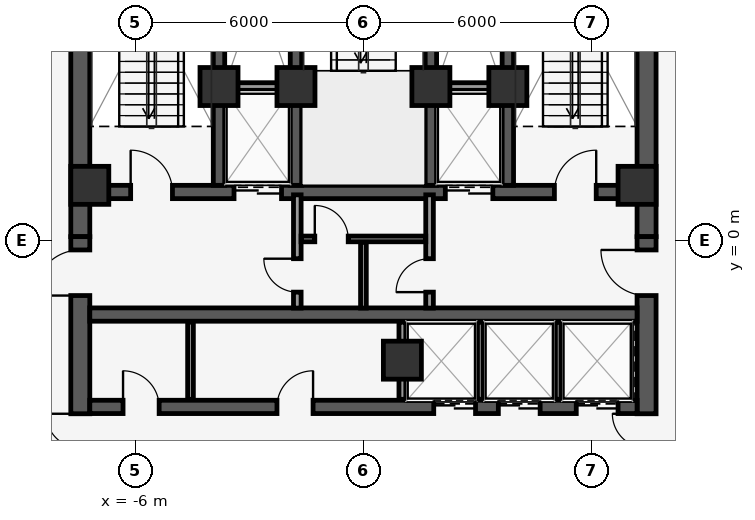
"""IFC4 building model, lengths in metres.
Left out: names, types, materials, properties, quantities, classifications, styles, units other than length and angle.
Written with IfcOpenShell. Run it as: python <this file> out.ifc"""

import sys

from ifc_helpers import new_model, si_unit, direction, frame, frame_2d, origin, origin_2d, place, context, subcontext, project, spatial, rectangle, extrude, element, fill, save


model = new_model("IFC4")
c1 = context("Model", 3, precision=1e-05, world=origin(), true_north=direction((0.0, 1.0)))
c2 = subcontext(c1, "Body", "Model", "MODEL_VIEW")
j1 = project(units=[si_unit("LENGTHUNIT", "METRE"), si_unit("PLANEANGLEUNIT", "RADIAN")], contexts=[c1])
p1 = place(None, origin())
s1 = spatial("IfcSite", under=j1, at=p1, CompositionType="ELEMENT")
p2 = place(p1, origin())
s2 = spatial("IfcBuilding", under=s1, at=p2, CompositionType="ELEMENT")
p3 = place(p2, frame((0.0, 0.0, 310.6)))
s3 = spatial("IfcBuildingStorey", under=s2, at=p3, CompositionType="ELEMENT", Elevation=310.6)
p4 = place(p3, frame((-7.2, 1.275, 0.0), z_axis=(0.0, 0.0, 1.0), x_axis=(1.0, 0.0, 0.0)))
e1 = element("IfcWall", 1, at=p4, inside=s3, PredefinedType="SHEAR", context=c2, shape_type="SweptSolid", body=[
    extrude(rectangle(XDim=14.4, YDim=0.35, at=frame_2d((7.2, 0.0))), origin(), (0.0, 0.0, 1.0), 3.85),
])
p5 = place(p4, frame((3.795, 0.0, 0.0)))
e2 = element("IfcOpeningElement", 2, at=p5, cuts=e1, PredefinedType="OPENING", context=c2, shape_type="SweptSolid", body=[
    extrude(rectangle(XDim=1.25, YDim=2.25, at=frame_2d((0.625, 1.125))), frame((0.0, 0.185, 0.0), z_axis=(0.0, -1.0, 0.0), x_axis=(1.0, 0.0, 0.0)), (0.0, 0.0, 1.0), 0.37),
])
p6 = place(p4, frame((9.355, 0.0, 0.0)))
e3 = element("IfcOpeningElement", 3, at=p6, cuts=e1, PredefinedType="OPENING", context=c2, shape_type="SweptSolid", body=[
    extrude(rectangle(XDim=1.25, YDim=2.25, at=frame_2d((0.625, 1.125))), frame((0.0, 0.185, 0.0), z_axis=(0.0, -1.0, 0.0), x_axis=(1.0, 0.0, 0.0)), (0.0, 0.0, 1.0), 0.37),
])
p7 = place(p4, frame((1.075, 0.0, 0.0)))
e4 = element("IfcOpeningElement", 4, at=p7, cuts=e1, PredefinedType="OPENING", context=c2, shape_type="SweptSolid", body=[
    extrude(rectangle(XDim=1.1, YDim=2.15, at=frame_2d((0.55, 1.075))), frame((0.0, 0.185, 0.0), z_axis=(0.0, -1.0, 0.0), x_axis=(1.0, 0.0, 0.0)), (0.0, 0.0, 1.0), 0.37),
])
p8 = place(p4, frame((12.225, 0.0, 0.0)))
e5 = element("IfcOpeningElement", 5, at=p8, cuts=e1, PredefinedType="OPENING", context=c2, shape_type="SweptSolid", body=[
    extrude(rectangle(XDim=1.1, YDim=2.15, at=frame_2d((0.55, 1.075))), frame((0.0, 0.185, 0.0), z_axis=(0.0, -1.0, 0.0), x_axis=(1.0, 0.0, 0.0)), (0.0, 0.0, 1.0), 0.37),
])
for number, where, z_axis, x_axis in (
    (6, (-3.8, 1.45, 0.0), (0.0, 0.0, 1.0), (0.0, 1.0, 0.0)),
    (7, (-1.775, 1.45, 0.0), (0.0, 0.0, 1.0), (0.0, 1.0, 0.0)),
    (8, (1.775, 1.45, 0.0), (0.0, 0.0, 1.0), (0.0, 1.0, 0.0)),
    (9, (3.8, 1.45, 0.0), (0.0, 0.0, 1.0), (0.0, 1.0, 0.0)),
):
    element("IfcWall", number, at=place(p3, frame(where, z_axis=z_axis, x_axis=x_axis)), inside=s3, PredefinedType="SHEAR", context=c2, shape_type="SweptSolid", body=[
        extrude(rectangle(XDim=7.7, YDim=0.3, at=frame_2d((3.85, 0.0))), origin(), (0.0, 0.0, 1.0), 3.85),
    ])
for number, where, z_axis, x_axis in (
    (10, (-7.45, 0.1, 0.0), (0.0, 0.0, 1.0), (0.0, 1.0, 0.0)),
    (11, (7.45, 0.1, 0.0), (0.0, 0.0, 1.0), (0.0, 1.0, 0.0)),
):
    element("IfcWall", number, at=place(p3, frame(where, z_axis=z_axis, x_axis=x_axis)), inside=s3, PredefinedType="SHEAR", context=c2, shape_type="SweptSolid", body=[
        extrude(rectangle(XDim=9.05, YDim=0.5, at=frame_2d((4.525, 0.0))), origin(), (0.0, 0.0, 1.0), 3.85),
    ])
p9 = place(p3, frame((-7.45, -9.0, 0.0), z_axis=(0.0, 0.0, 1.0), x_axis=(0.0, 1.0, 0.0)))
e12 = element("IfcWall", 12, at=p9, inside=s3, PredefinedType="SHEAR", context=c2, shape_type="SweptSolid", body=[
    extrude(rectangle(XDim=9.1, YDim=0.5, at=frame_2d((4.55, 0.0))), origin(), (0.0, 0.0, 1.0), 3.85),
])
p10 = place(p9, frame((2.64, 0.0, 0.0)))
e13 = element("IfcOpeningElement", 13, at=p10, cuts=e12, PredefinedType="OPENING", context=c2, shape_type="SweptSolid", body=[
    extrude(rectangle(XDim=1.8, YDim=2.2, at=frame_2d((0.9, 1.1))), frame((0.0, 0.26, 0.0), z_axis=(0.0, -1.0, 0.0), x_axis=(1.0, 0.0, 0.0)), (0.0, 0.0, 1.0), 0.52),
])
p11 = place(p9, frame((7.55, 0.0, 0.0)))
e14 = element("IfcOpeningElement", 14, at=p11, cuts=e12, PredefinedType="OPENING", context=c2, shape_type="SweptSolid", body=[
    extrude(rectangle(XDim=1.2, YDim=2.15, at=frame_2d((0.6, 1.075))), frame((0.0, 0.26, 0.0), z_axis=(0.0, -1.0, 0.0), x_axis=(1.0, 0.0, 0.0)), (0.0, 0.0, 1.0), 0.52),
])
p12 = place(p3, frame((7.45, -9.0, 0.0), z_axis=(0.0, 0.0, 1.0), x_axis=(0.0, 1.0, 0.0)))
e15 = element("IfcWall", 15, at=p12, inside=s3, PredefinedType="SHEAR", context=c2, shape_type="SweptSolid", body=[
    extrude(rectangle(XDim=9.1, YDim=0.5, at=frame_2d((4.55, 0.0))), origin(), (0.0, 0.0, 1.0), 3.85),
])
p13 = place(p12, frame((2.64, 0.0, 0.0)))
e16 = element("IfcOpeningElement", 16, at=p13, cuts=e15, PredefinedType="OPENING", context=c2, shape_type="SweptSolid", body=[
    extrude(rectangle(XDim=1.8, YDim=2.2, at=frame_2d((0.9, 1.1))), frame((0.0, 0.26, 0.0), z_axis=(0.0, -1.0, 0.0), x_axis=(1.0, 0.0, 0.0)), (0.0, 0.0, 1.0), 0.52),
])
p14 = place(p12, frame((7.55, 0.0, 0.0)))
e17 = element("IfcOpeningElement", 17, at=p14, cuts=e15, PredefinedType="OPENING", context=c2, shape_type="SweptSolid", body=[
    extrude(rectangle(XDim=1.2, YDim=2.15, at=frame_2d((0.6, 1.075))), frame((0.0, 0.26, 0.0), z_axis=(0.0, -1.0, 0.0), x_axis=(1.0, 0.0, 0.0)), (0.0, 0.0, 1.0), 0.52),
])
p15 = place(p3, frame((-7.2, -1.95, 0.0), z_axis=(0.0, 0.0, 1.0), x_axis=(1.0, 0.0, 0.0)))
e18 = element("IfcWall", 18, at=p15, inside=s3, PredefinedType="SHEAR", context=c2, shape_type="SweptSolid", body=[
    extrude(rectangle(XDim=14.4, YDim=0.35, at=frame_2d((7.2, 0.0))), origin(), (0.0, 0.0, 1.0), 3.85),
])
p16 = place(p3, frame((-7.2, -4.38, 0.0), z_axis=(0.0, 0.0, 1.0), x_axis=(1.0, 0.0, 0.0)))
e19 = element("IfcWall", 19, at=p16, inside=s3, PredefinedType="SHEAR", context=c2, shape_type="SweptSolid", body=[
    extrude(rectangle(XDim=14.4, YDim=0.35, at=frame_2d((7.2, 0.0))), origin(), (0.0, 0.0, 1.0), 3.85),
])
p17 = place(p16, frame((9.05, 0.0, 0.0)))
e20 = element("IfcOpeningElement", 20, at=p17, cuts=e19, PredefinedType="OPENING", context=c2, shape_type="SweptSolid", body=[
    extrude(rectangle(XDim=1.1, YDim=2.2, at=frame_2d((0.55, 1.1))), frame((0.0, 0.185, 0.0), z_axis=(0.0, -1.0, 0.0), x_axis=(1.0, 0.0, 0.0)), (0.0, 0.0, 1.0), 0.37),
])
p18 = place(p16, frame((10.75, 0.0, 0.0)))
e21 = element("IfcOpeningElement", 21, at=p18, cuts=e19, PredefinedType="OPENING", context=c2, shape_type="SweptSolid", body=[
    extrude(rectangle(XDim=1.1, YDim=2.2, at=frame_2d((0.55, 1.1))), frame((0.0, 0.185, 0.0), z_axis=(0.0, -1.0, 0.0), x_axis=(1.0, 0.0, 0.0)), (0.0, 0.0, 1.0), 0.37),
])
p19 = place(p16, frame((12.8, 0.0, 0.0)))
e22 = element("IfcOpeningElement", 22, at=p19, cuts=e19, PredefinedType="OPENING", context=c2, shape_type="SweptSolid", body=[
    extrude(rectangle(XDim=1.1, YDim=2.2, at=frame_2d((0.55, 1.1))), frame((0.0, 0.185, 0.0), z_axis=(0.0, -1.0, 0.0), x_axis=(1.0, 0.0, 0.0)), (0.0, 0.0, 1.0), 0.37),
])
p20 = place(p16, frame((0.875, 0.0, 0.0)))
e23 = element("IfcOpeningElement", 23, at=p20, cuts=e19, PredefinedType="OPENING", context=c2, shape_type="SweptSolid", body=[
    extrude(rectangle(XDim=0.95, YDim=2.15, at=frame_2d((0.475, 1.075))), frame((0.0, 0.185, 0.0), z_axis=(0.0, -1.0, 0.0), x_axis=(1.0, 0.0, 0.0)), (0.0, 0.0, 1.0), 0.37),
])
p21 = place(p16, frame((4.925, 0.0, 0.0)))
e24 = element("IfcOpeningElement", 24, at=p21, cuts=e19, PredefinedType="OPENING", context=c2, shape_type="SweptSolid", body=[
    extrude(rectangle(XDim=0.95, YDim=2.15, at=frame_2d((0.475, 1.075))), frame((0.0, 0.185, 0.0), z_axis=(0.0, -1.0, 0.0), x_axis=(1.0, 0.0, 0.0)), (0.0, 0.0, 1.0), 0.37),
])
for number, where, z_axis, x_axis in (
    (25, (7.2, 1.45, 0.0), (0.0, 0.0, 1.0), (1.0, 0.0, 0.0)),
    (26, (-7.2, 1.45, 0.0), (0.0, 0.0, 1.0), (1.0, 0.0, 0.0)),
    (27, (-3.8, 4.05, 0.0), (0.0, 0.0, 1.0), (1.0, 0.0, 0.0)),
    (28, (3.8, 4.05, 0.0), (0.0, 0.0, 1.0), (1.0, 0.0, 0.0)),
    (29, (-1.775, 4.05, 0.0), (0.0, 0.0, 1.0), (1.0, 0.0, 0.0)),
    (30, (1.775, 4.05, 0.0), (0.0, 0.0, 1.0), (1.0, 0.0, 0.0)),
    (31, (1.025, -3.15, 0.0), (0.0, 0.0, 1.0), (1.0, 0.0, 0.0)),
):
    element("IfcColumn", number, at=place(p3, frame(where, z_axis=z_axis, x_axis=x_axis)), inside=s3, PredefinedType="COLUMN", context=c2, shape_type="SweptSolid", body=[
        extrude(rectangle(XDim=1.0, YDim=1.0, at=origin_2d()), origin(), (0.0, 0.0, 1.0), 4.1),
    ])
p22 = place(p3, frame((25.8, 9.083, 0.0), z_axis=(0.0, 0.0, 1.0), x_axis=(-0.55919392155, -0.829036885851, 0.0)))
e32 = element("IfcWall", 32, at=p22, inside=s3, PredefinedType="STANDARD", context=c2, shape_type="SweptSolid", body=[
    extrude(rectangle(XDim=43.915, YDim=0.28, at=frame_2d((21.958, 0.0))), origin(), (0.0, 0.0, 1.0), 3.85),
])
p23 = place(p22, frame((21.457, 0.0, 0.0)))
e33 = element("IfcOpeningElement", 33, at=p23, cuts=e32, PredefinedType="OPENING", context=c2, shape_type="SweptSolid", body=[
    extrude(rectangle(XDim=1.0, YDim=2.15, at=frame_2d((0.5, 1.075))), frame((0.0, 0.15, 0.0), z_axis=(0.0, -1.0, 0.0), x_axis=(1.0, 0.0, 0.0)), (0.0, 0.0, 1.0), 0.3),
])
p24 = place(p22, frame((4.607, 0.0, 0.85)))
e34 = element("IfcOpeningElement", 34, at=p24, cuts=e32, PredefinedType="OPENING", context=c2, shape_type="SweptSolid", body=[
    extrude(rectangle(XDim=1.1, YDim=2.15, at=frame_2d((0.55, 1.075))), frame((0.0, 0.15, 0.0), z_axis=(0.0, -1.0, 0.0), x_axis=(1.0, 0.0, 0.0)), (0.0, 0.0, 1.0), 0.3),
])
p25 = place(p22, frame((15.807, 0.0, 0.85)))
e35 = element("IfcOpeningElement", 35, at=p25, cuts=e32, PredefinedType="OPENING", context=c2, shape_type="SweptSolid", body=[
    extrude(rectangle(XDim=1.1, YDim=2.15, at=frame_2d((0.55, 1.075))), frame((0.0, 0.15, 0.0), z_axis=(0.0, -1.0, 0.0), x_axis=(1.0, 0.0, 0.0)), (0.0, 0.0, 1.0), 0.3),
])
p26 = place(p22, frame((27.007, 0.0, 0.85)))
e36 = element("IfcOpeningElement", 36, at=p26, cuts=e32, PredefinedType="OPENING", context=c2, shape_type="SweptSolid", body=[
    extrude(rectangle(XDim=1.1, YDim=2.15, at=frame_2d((0.55, 1.075))), frame((0.0, 0.15, 0.0), z_axis=(0.0, -1.0, 0.0), x_axis=(1.0, 0.0, 0.0)), (0.0, 0.0, 1.0), 0.3),
])
p27 = place(p22, frame((32.607, 0.0, 0.85)))
e37 = element("IfcOpeningElement", 37, at=p27, cuts=e32, PredefinedType="OPENING", context=c2, shape_type="SweptSolid", body=[
    extrude(rectangle(XDim=1.1, YDim=2.15, at=frame_2d((0.55, 1.075))), frame((0.0, 0.15, 0.0), z_axis=(0.0, -1.0, 0.0), x_axis=(1.0, 0.0, 0.0)), (0.0, 0.0, 1.0), 0.3),
])
p28 = place(p22, frame((38.207, 0.0, 0.85)))
e38 = element("IfcOpeningElement", 38, at=p28, cuts=e32, PredefinedType="OPENING", context=c2, shape_type="SweptSolid", body=[
    extrude(rectangle(XDim=1.1, YDim=2.15, at=frame_2d((0.55, 1.075))), frame((0.0, 0.15, 0.0), z_axis=(0.0, -1.0, 0.0), x_axis=(1.0, 0.0, 0.0)), (0.0, 0.0, 1.0), 0.3),
])
p29 = place(p3, frame((-4.988, -26.865, 0.0), z_axis=(0.0, 0.0, 1.0), x_axis=(-0.431592936847, 0.902068476815, 0.0)))
e39 = element("IfcWall", 39, at=p29, inside=s3, PredefinedType="STANDARD", context=c2, shape_type="SweptSolid", body=[
    extrude(rectangle(XDim=43.18, YDim=0.28, at=frame_2d((21.59, 0.0))), origin(), (0.0, 0.0, 1.0), 3.85),
])
p30 = place(p29, frame((4.24, 0.0, 0.85)))
e40 = element("IfcOpeningElement", 40, at=p30, cuts=e39, PredefinedType="OPENING", context=c2, shape_type="SweptSolid", body=[
    extrude(rectangle(XDim=1.1, YDim=2.15, at=frame_2d((0.55, 1.075))), frame((0.0, 0.15, 0.0), z_axis=(0.0, -1.0, 0.0), x_axis=(1.0, 0.0, 0.0)), (0.0, 0.0, 1.0), 0.3),
])
p31 = place(p29, frame((9.84, 0.0, 0.85)))
e41 = element("IfcOpeningElement", 41, at=p31, cuts=e39, PredefinedType="OPENING", context=c2, shape_type="SweptSolid", body=[
    extrude(rectangle(XDim=1.1, YDim=2.15, at=frame_2d((0.55, 1.075))), frame((0.0, 0.15, 0.0), z_axis=(0.0, -1.0, 0.0), x_axis=(1.0, 0.0, 0.0)), (0.0, 0.0, 1.0), 0.3),
])
p32 = place(p29, frame((32.24, 0.0, 0.85)))
e42 = element("IfcOpeningElement", 42, at=p32, cuts=e39, PredefinedType="OPENING", context=c2, shape_type="SweptSolid", body=[
    extrude(rectangle(XDim=1.1, YDim=2.15, at=frame_2d((0.55, 1.075))), frame((0.0, 0.15, 0.0), z_axis=(0.0, -1.0, 0.0), x_axis=(1.0, 0.0, 0.0)), (0.0, 0.0, 1.0), 0.3),
])
p33 = place(p29, frame((37.84, 0.0, 0.85)))
e43 = element("IfcOpeningElement", 43, at=p33, cuts=e39, PredefinedType="OPENING", context=c2, shape_type="SweptSolid", body=[
    extrude(rectangle(XDim=1.1, YDim=2.15, at=frame_2d((0.55, 1.075))), frame((0.0, 0.15, 0.0), z_axis=(0.0, -1.0, 0.0), x_axis=(1.0, 0.0, 0.0)), (0.0, 0.0, 1.0), 0.3),
])
for number, where, z_axis, x_axis in (
    (44, (-3.65, 4.05, 0.0), (0.0, 0.0, 1.0), (1.0, 0.0, 0.0)),
    (45, (1.92, 4.05, 0.0), (0.0, 0.0, 1.0), (1.0, 0.0, 0.0)),
):
    element("IfcWall", number, at=place(p3, frame(where, z_axis=z_axis, x_axis=x_axis)), inside=s3, PredefinedType="PARTITIONING", context=c2, shape_type="SweptSolid", body=[
        extrude(rectangle(XDim=1.73, YDim=0.2, at=frame_2d((0.865, 0.0))), origin(), (0.0, 0.0, 1.0), 3.85),
    ])
p34 = place(p3, frame((1.025, -4.18, 0.0), z_axis=(0.0, 0.0, 1.0), x_axis=(0.0, 1.0, 0.0)))
e46 = element("IfcWall", 46, at=p34, inside=s3, PredefinedType="PARTITIONING", context=c2, shape_type="SweptSolid", body=[
    extrude(rectangle(XDim=2.03, YDim=0.18, at=frame_2d((1.015, 0.0))), origin(), (0.0, 0.0, 1.0), 2.898),
])
for number, where, z_axis, x_axis in (
    (47, (-4.55, -4.18, 0.0), (0.0, 0.0, 1.0), (0.0, 1.0, 0.0)),
    (48, (3.075, -4.18, 0.0), (0.0, 0.0, 1.0), (0.0, 1.0, 0.0)),
    (49, (5.125, -4.18, 0.0), (0.0, 0.0, 1.0), (0.0, 1.0, 0.0)),
):
    element("IfcWall", number, at=place(p3, frame(where, z_axis=z_axis, x_axis=x_axis)), inside=s3, PredefinedType="PARTITIONING", context=c2, shape_type="SweptSolid", body=[
        extrude(rectangle(XDim=2.03, YDim=0.15, at=frame_2d((1.015, 0.0))), origin(), (0.0, 0.0, 1.0), 3.85),
    ])
p35 = place(p3, frame((-1.74, -1.78, 0.0), z_axis=(0.0, 0.0, 1.0), x_axis=(0.0, 1.0, 0.0)))
e50 = element("IfcWall", 50, at=p35, inside=s3, PredefinedType="PARTITIONING", context=c2, shape_type="SweptSolid", body=[
    extrude(rectangle(XDim=2.98, YDim=0.2, at=frame_2d((1.49, 0.0))), origin(), (0.0, 0.0, 1.0), 3.85),
])
p36 = place(p35, frame((0.42, 0.0, 0.0)))
e51 = element("IfcOpeningElement", 51, at=p36, cuts=e50, PredefinedType="OPENING", context=c2, shape_type="SweptSolid", body=[
    extrude(rectangle(XDim=0.88, YDim=2.15, at=frame_2d((0.44, 1.075))), frame((0.0, 0.11, 0.0), z_axis=(0.0, -1.0, 0.0), x_axis=(1.0, 0.0, 0.0)), (0.0, 0.0, 1.0), 0.22),
])
p37 = place(p3, frame((1.74, -1.78, 0.0), z_axis=(0.0, 0.0, 1.0), x_axis=(0.0, 1.0, 0.0)))
e52 = element("IfcWall", 52, at=p37, inside=s3, PredefinedType="PARTITIONING", context=c2, shape_type="SweptSolid", body=[
    extrude(rectangle(XDim=2.98, YDim=0.2, at=frame_2d((1.49, 0.0))), origin(), (0.0, 0.0, 1.0), 3.85),
])
p38 = place(p37, frame((0.42, 0.0, 0.0)))
e53 = element("IfcOpeningElement", 53, at=p38, cuts=e52, PredefinedType="OPENING", context=c2, shape_type="SweptSolid", body=[
    extrude(rectangle(XDim=0.88, YDim=2.15, at=frame_2d((0.44, 1.075))), frame((0.0, 0.11, 0.0), z_axis=(0.0, -1.0, 0.0), x_axis=(1.0, 0.0, 0.0)), (0.0, 0.0, 1.0), 0.22),
])
p39 = place(p3, frame((-1.64, 0.04, 0.0), z_axis=(0.0, 0.0, 1.0), x_axis=(1.0, 0.0, 0.0)))
e54 = element("IfcWall", 54, at=p39, inside=s3, PredefinedType="PARTITIONING", context=c2, shape_type="SweptSolid", body=[
    extrude(rectangle(XDim=3.28, YDim=0.15, at=frame_2d((1.64, 0.0))), origin(), (0.0, 0.0, 1.0), 3.85),
])
p40 = place(p39, frame((0.36, 0.0, 0.0)))
e55 = element("IfcOpeningElement", 55, at=p40, cuts=e54, PredefinedType="OPENING", context=c2, shape_type="SweptSolid", body=[
    extrude(rectangle(XDim=0.88, YDim=2.1, at=frame_2d((0.44, 1.05))), frame((0.0, 0.085, 0.0), z_axis=(0.0, -1.0, 0.0), x_axis=(1.0, 0.0, 0.0)), (0.0, 0.0, 1.0), 0.17),
])
p41 = place(p3, frame((0.0, -1.78, 0.0), z_axis=(0.0, 0.0, 1.0), x_axis=(0.0, 1.0, 0.0)))
e56 = element("IfcWall", 56, at=p41, inside=s3, PredefinedType="PARTITIONING", context=c2, shape_type="SweptSolid", body=[
    extrude(rectangle(XDim=1.73, YDim=0.15, at=frame_2d((0.865, 0.0))), origin(), (0.0, 0.0, 1.0), 3.85),
])
p42 = place(p17, origin())
e57 = element("IfcDoor", 57, at=p42, inside=s3, OperationType="DOUBLE_DOOR_SLIDING", PredefinedType="DOOR", context=c2, shape_type="SweptSolid", body=[
    extrude(rectangle(XDim=1.1, YDim=2.2, at=frame_2d((0.55, 1.1))), frame((0.0, 0.025, 0.0), z_axis=(0.0, -1.0, 0.0), x_axis=(1.0, 0.0, 0.0)), (0.0, 0.0, 1.0), 0.05),
])
fill(e20, e57)
p43 = place(p18, origin())
e58 = element("IfcDoor", 58, at=p43, inside=s3, OperationType="DOUBLE_DOOR_SLIDING", PredefinedType="DOOR", context=c2, shape_type="SweptSolid", body=[
    extrude(rectangle(XDim=1.1, YDim=2.2, at=frame_2d((0.55, 1.1))), frame((0.0, 0.025, 0.0), z_axis=(0.0, -1.0, 0.0), x_axis=(1.0, 0.0, 0.0)), (0.0, 0.0, 1.0), 0.05),
])
fill(e21, e58)
p44 = place(p19, origin())
e59 = element("IfcDoor", 59, at=p44, inside=s3, OperationType="DOUBLE_DOOR_SLIDING", PredefinedType="DOOR", context=c2, shape_type="SweptSolid", body=[
    extrude(rectangle(XDim=1.1, YDim=2.2, at=frame_2d((0.55, 1.1))), frame((0.0, 0.025, 0.0), z_axis=(0.0, -1.0, 0.0), x_axis=(1.0, 0.0, 0.0)), (0.0, 0.0, 1.0), 0.05),
])
fill(e22, e59)
p45 = place(p5, origin())
e60 = element("IfcDoor", 60, at=p45, inside=s3, OperationType="DOUBLE_DOOR_SLIDING", PredefinedType="DOOR", context=c2, shape_type="SweptSolid", body=[
    extrude(rectangle(XDim=1.25, YDim=2.25, at=frame_2d((0.625, 1.125))), frame((0.0, 0.025, 0.0), z_axis=(0.0, -1.0, 0.0), x_axis=(1.0, 0.0, 0.0)), (0.0, 0.0, 1.0), 0.05),
])
fill(e2, e60)
p46 = place(p6, origin())
e61 = element("IfcDoor", 61, at=p46, inside=s3, OperationType="DOUBLE_DOOR_SLIDING", PredefinedType="DOOR", context=c2, shape_type="SweptSolid", body=[
    extrude(rectangle(XDim=1.25, YDim=2.25, at=frame_2d((0.625, 1.125))), frame((0.0, 0.025, 0.0), z_axis=(0.0, -1.0, 0.0), x_axis=(1.0, 0.0, 0.0)), (0.0, 0.0, 1.0), 0.05),
])
fill(e3, e61)
p47 = place(p7, origin())
e62 = element("IfcDoor", 62, at=p47, inside=s3, OperationType="SINGLE_SWING_LEFT", PredefinedType="DOOR", context=c2, shape_type="SweptSolid", body=[
    extrude(rectangle(XDim=1.1, YDim=2.15, at=frame_2d((0.55, 1.075))), frame((0.0, 0.025, 0.0), z_axis=(0.0, -1.0, 0.0), x_axis=(1.0, 0.0, 0.0)), (0.0, 0.0, 1.0), 0.05),
])
fill(e4, e62)
p48 = place(p8, origin())
e63 = element("IfcDoor", 63, at=p48, inside=s3, OperationType="SINGLE_SWING_RIGHT", PredefinedType="DOOR", context=c2, shape_type="SweptSolid", body=[
    extrude(rectangle(XDim=1.1, YDim=2.15, at=frame_2d((0.55, 1.075))), frame((0.0, 0.025, 0.0), z_axis=(0.0, -1.0, 0.0), x_axis=(1.0, 0.0, 0.0)), (0.0, 0.0, 1.0), 0.05),
])
fill(e5, e63)
p49 = place(p10, origin())
e64 = element("IfcDoor", 64, at=p49, inside=s3, OperationType="DOUBLE_DOOR_SINGLE_SWING", PredefinedType="DOOR", context=c2, shape_type="SweptSolid", body=[
    extrude(rectangle(XDim=1.8, YDim=2.2, at=frame_2d((0.9, 1.1))), frame((0.0, 0.025, 0.0), z_axis=(0.0, -1.0, 0.0), x_axis=(1.0, 0.0, 0.0)), (0.0, 0.0, 1.0), 0.05),
])
fill(e13, e64)
p50 = place(p11, origin())
e65 = element("IfcDoor", 65, at=p50, inside=s3, OperationType="SINGLE_SWING_LEFT", PredefinedType="DOOR", context=c2, shape_type="SweptSolid", body=[
    extrude(rectangle(XDim=1.2, YDim=2.15, at=frame_2d((0.6, 1.075))), frame((0.0, 0.025, 0.0), z_axis=(0.0, -1.0, 0.0), x_axis=(1.0, 0.0, 0.0)), (0.0, 0.0, 1.0), 0.05),
])
fill(e14, e65)
p51 = place(p13, origin())
e66 = element("IfcDoor", 66, at=p51, inside=s3, OperationType="DOUBLE_DOOR_SINGLE_SWING", PredefinedType="DOOR", context=c2, shape_type="SweptSolid", body=[
    extrude(rectangle(XDim=1.8, YDim=2.2, at=frame_2d((0.9, 1.1))), frame((0.0, 0.025, 0.0), z_axis=(0.0, -1.0, 0.0), x_axis=(1.0, 0.0, 0.0)), (0.0, 0.0, 1.0), 0.05),
])
fill(e16, e66)
p52 = place(p14, origin())
e67 = element("IfcDoor", 67, at=p52, inside=s3, OperationType="SINGLE_SWING_RIGHT", PredefinedType="DOOR", context=c2, shape_type="SweptSolid", body=[
    extrude(rectangle(XDim=1.2, YDim=2.15, at=frame_2d((0.6, 1.075))), frame((0.0, 0.025, 0.0), z_axis=(0.0, -1.0, 0.0), x_axis=(1.0, 0.0, 0.0)), (0.0, 0.0, 1.0), 0.05),
])
fill(e17, e67)
p53 = place(p20, origin())
e68 = element("IfcDoor", 68, at=p53, inside=s3, OperationType="SINGLE_SWING_LEFT", PredefinedType="DOOR", context=c2, shape_type="SweptSolid", body=[
    extrude(rectangle(XDim=0.95, YDim=2.15, at=frame_2d((0.475, 1.075))), frame((0.0, 0.025, 0.0), z_axis=(0.0, -1.0, 0.0), x_axis=(1.0, 0.0, 0.0)), (0.0, 0.0, 1.0), 0.05),
])
fill(e23, e68)
p54 = place(p21, origin())
e69 = element("IfcDoor", 69, at=p54, inside=s3, OperationType="SINGLE_SWING_RIGHT", PredefinedType="DOOR", context=c2, shape_type="SweptSolid", body=[
    extrude(rectangle(XDim=0.95, YDim=2.15, at=frame_2d((0.475, 1.075))), frame((0.0, 0.025, 0.0), z_axis=(0.0, -1.0, 0.0), x_axis=(1.0, 0.0, 0.0)), (0.0, 0.0, 1.0), 0.05),
])
fill(e24, e69)
p55 = place(p40, origin())
e70 = element("IfcDoor", 70, at=p55, inside=s3, OperationType="SINGLE_SWING_LEFT", PredefinedType="DOOR", context=c2, shape_type="SweptSolid", body=[
    extrude(rectangle(XDim=0.88, YDim=2.1, at=frame_2d((0.44, 1.05))), frame((0.0, 0.025, 0.0), z_axis=(0.0, -1.0, 0.0), x_axis=(1.0, 0.0, 0.0)), (0.0, 0.0, 1.0), 0.05),
])
fill(e55, e70)
p56 = place(p36, origin())
e71 = element("IfcDoor", 71, at=p56, inside=s3, OperationType="SINGLE_SWING_RIGHT", PredefinedType="DOOR", context=c2, shape_type="SweptSolid", body=[
    extrude(rectangle(XDim=0.88, YDim=2.15, at=frame_2d((0.44, 1.075))), frame((0.0, 0.025, 0.0), z_axis=(0.0, -1.0, 0.0), x_axis=(1.0, 0.0, 0.0)), (0.0, 0.0, 1.0), 0.05),
])
fill(e51, e71)
p57 = place(p38, origin())
e72 = element("IfcDoor", 72, at=p57, inside=s3, OperationType="SINGLE_SWING_LEFT", PredefinedType="DOOR", context=c2, shape_type="SweptSolid", body=[
    extrude(rectangle(XDim=0.88, YDim=2.15, at=frame_2d((0.44, 1.075))), frame((0.0, 0.025, 0.0), z_axis=(0.0, -1.0, 0.0), x_axis=(1.0, 0.0, 0.0)), (0.0, 0.0, 1.0), 0.05),
])
fill(e53, e72)
save(model, sys.argv[1])
